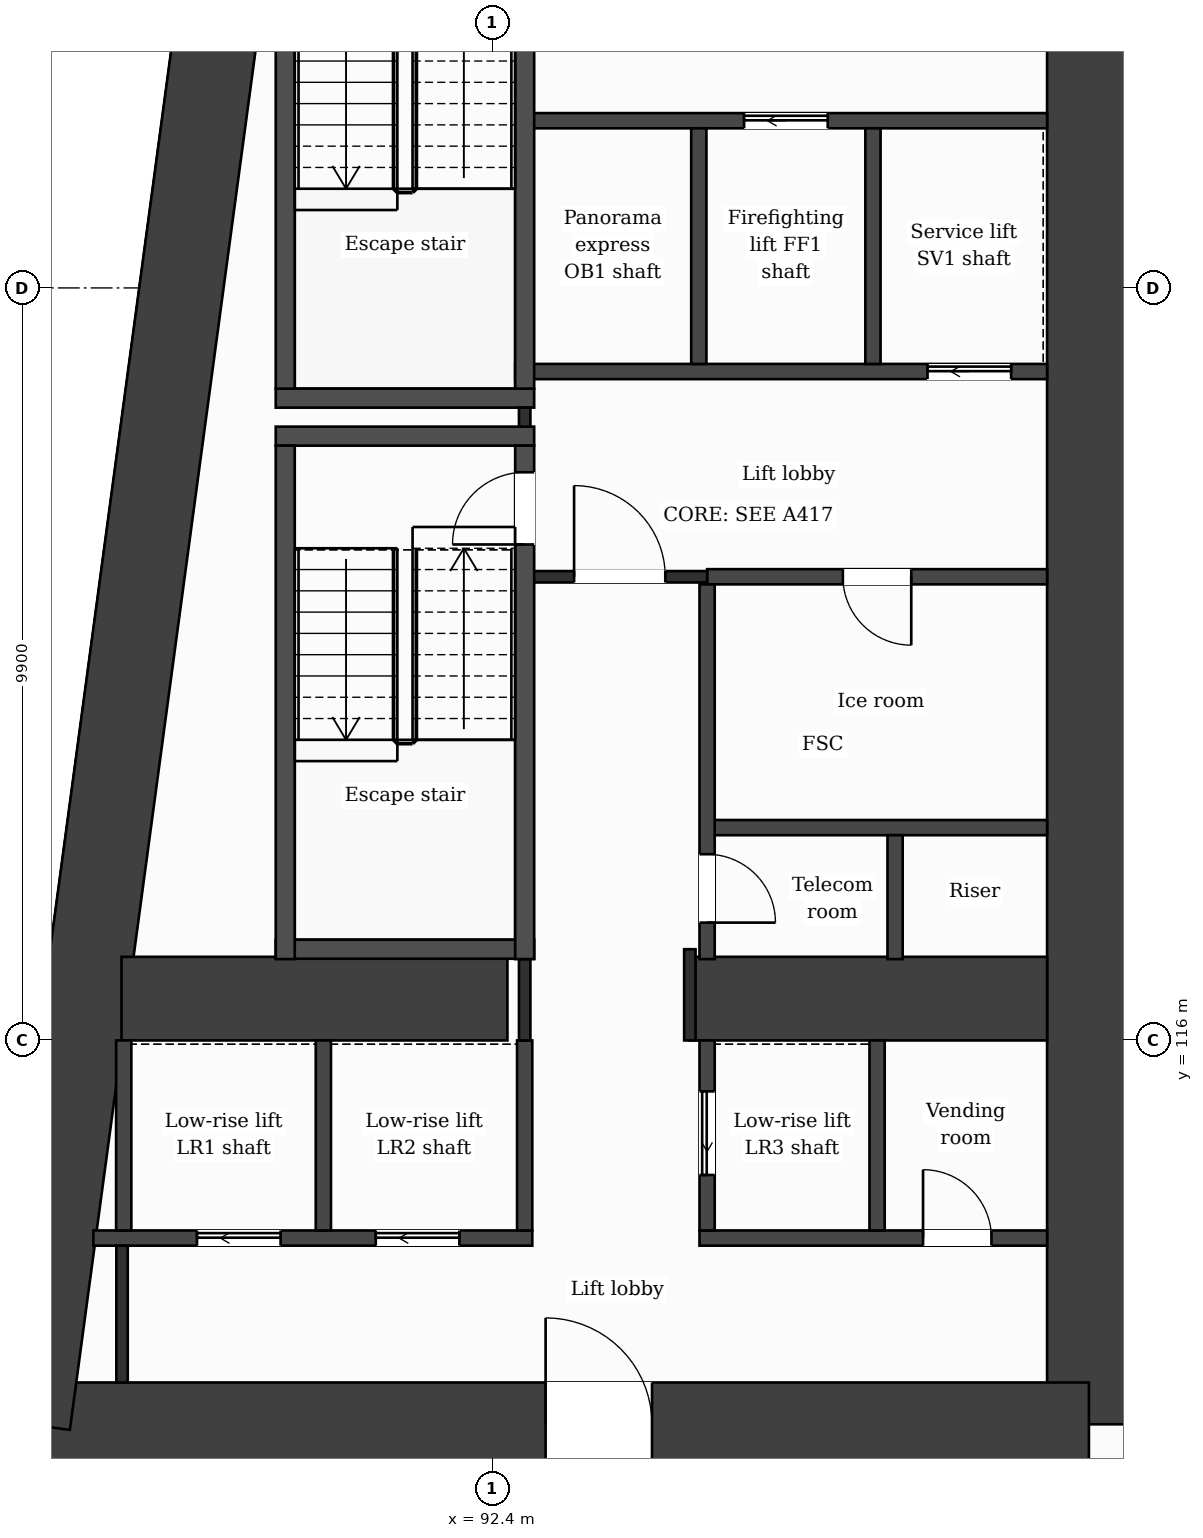
"""IFC4 building model, lengths in metres.
Left out: names, types, materials, properties, quantities, classifications, styles, units other than length and angle.
Written with IfcOpenShell. Run it as: python <this file> out.ifc"""

import sys

from ifc_helpers import new_model, si_unit, direction, frame, frame_2d, origin, place, context, subcontext, project, spatial, rectangle, extrude, element, fill, save


model = new_model("IFC4")
c1 = context("Model", 3, precision=1e-05, world=origin(), true_north=direction((0.0, 1.0)))
c2 = subcontext(c1, "Body", "Model", "MODEL_VIEW")
j1 = project(units=[si_unit("LENGTHUNIT", "METRE"), si_unit("PLANEANGLEUNIT", "RADIAN")], contexts=[c1])
p1 = place(None, origin())
s1 = spatial("IfcSite", under=j1, at=p1, CompositionType="ELEMENT")
p2 = place(p1, origin())
s2 = spatial("IfcBuilding", under=s1, at=p2, CompositionType="ELEMENT")
p3 = place(p2, frame((0.0, 0.0, 74.0)))
s3 = spatial("IfcBuildingStorey", under=s2, at=p3, CompositionType="ELEMENT", Elevation=74.0)
p4 = place(p3, frame((100.25, 131.85, 0.0), z_axis=(0.0, 0.0, 1.0), x_axis=(0.0, -1.0, 0.0)))
e1 = element("IfcWall", 1, at=p4, inside=s3, PredefinedType="SHEAR", context=c2, shape_type="SweptSolid", body=[
    extrude(rectangle(XDim=20.9, YDim=1.1, at=frame_2d((10.45, 0.0))), origin(), (0.0, 0.0, 1.0), 3.5),
])
p5 = place(p3, frame((100.25, 110.95, 0.0), z_axis=(0.0, 0.0, 1.0), x_axis=(-1.0, 0.0, 0.0)))
e2 = element("IfcWall", 2, at=p5, inside=s3, PredefinedType="SHEAR", context=c2, shape_type="SweptSolid", body=[
    extrude(rectangle(XDim=13.952, YDim=1.1, at=frame_2d((6.976, 0.0))), origin(), (0.0, 0.0, 1.0), 3.5),
])
p6 = place(p5, frame((5.748, 0.0, 0.0)))
e3 = element("IfcOpeningElement", 3, at=p6, cuts=e2, PredefinedType="OPENING", context=c2, shape_type="SweptSolid", body=[
    extrude(rectangle(XDim=1.4, YDim=2.1, at=frame_2d((0.7, 1.05))), frame((0.0, 0.56, 0.0), z_axis=(0.0, -1.0, 0.0), x_axis=(1.0, 0.0, 0.0)), (0.0, 0.0, 1.0), 1.12),
])
p7 = place(p3, frame((86.298, 110.95, 0.0), z_axis=(0.0, 0.0, 1.0), x_axis=(0.133400422634, 0.99106222168, 0.0)))
e4 = element("IfcWall", 4, at=p7, inside=s3, PredefinedType="SHEAR", context=c2, shape_type="SweptSolid", body=[
    extrude(rectangle(XDim=21.089, YDim=1.1, at=frame_2d((10.544, 0.0))), origin(), (0.0, 0.0, 1.0), 3.5),
])
p8 = place(p3, frame((87.523, 116.55, 0.0), z_axis=(0.0, 0.0, 1.0), x_axis=(1.0, 0.0, 0.0)))
e5 = element("IfcWall", 5, at=p8, inside=s3, PredefinedType="SHEAR", context=c2, shape_type="SweptSolid", body=[
    extrude(rectangle(XDim=5.077, YDim=1.1, at=frame_2d((2.539, 0.0))), origin(), (0.0, 0.0, 1.0), 3.5),
])
p9 = place(p3, frame((95.0, 116.55, 0.0), z_axis=(0.0, 0.0, 1.0), x_axis=(1.0, 0.0, 0.0)))
e6 = element("IfcWall", 6, at=p9, inside=s3, PredefinedType="SHEAR", context=c2, shape_type="SweptSolid", body=[
    extrude(rectangle(XDim=4.7, YDim=1.1, at=frame_2d((2.35, 0.0))), origin(), (0.0, 0.0, 1.0), 3.5),
])
p10 = place(p3, frame((87.153, 113.4, 0.0), z_axis=(0.0, 0.0, 1.0), x_axis=(1.0, 0.0, 0.0)))
e7 = element("IfcWall", 7, at=p10, inside=s3, PredefinedType="PARTITIONING", context=c2, shape_type="SweptSolid", body=[
    extrude(rectangle(XDim=5.774, YDim=0.2, at=frame_2d((2.887, 0.0))), origin(), (0.0, 0.0, 1.0), 3.18),
])
p11 = place(p10, frame((1.363, 0.0, 0.0)))
e8 = element("IfcOpeningElement", 8, at=p11, cuts=e7, PredefinedType="OPENING", context=c2, shape_type="SweptSolid", body=[
    extrude(rectangle(XDim=1.1, YDim=2.1, at=frame_2d((0.55, 1.05))), frame((0.0, 0.11, 0.0), z_axis=(0.0, -1.0, 0.0), x_axis=(1.0, 0.0, 0.0)), (0.0, 0.0, 1.0), 0.22),
])
p12 = place(p10, frame((3.715, 0.0, 0.0)))
e9 = element("IfcOpeningElement", 9, at=p12, cuts=e7, PredefinedType="OPENING", context=c2, shape_type="SweptSolid", body=[
    extrude(rectangle(XDim=1.1, YDim=2.1, at=frame_2d((0.55, 1.05))), frame((0.0, 0.11, 0.0), z_axis=(0.0, -1.0, 0.0), x_axis=(1.0, 0.0, 0.0)), (0.0, 0.0, 1.0), 0.22),
])
p13 = place(p3, frame((95.127, 113.4, 0.0), z_axis=(0.0, 0.0, 1.0), x_axis=(1.0, 0.0, 0.0)))
e10 = element("IfcWall", 10, at=p13, inside=s3, PredefinedType="PARTITIONING", context=c2, shape_type="SweptSolid", body=[
    extrude(rectangle(XDim=4.573, YDim=0.2, at=frame_2d((2.287, 0.0))), origin(), (0.0, 0.0, 1.0), 3.18),
])
p14 = place(p13, frame((2.941, 0.0, 0.0)))
e11 = element("IfcOpeningElement", 11, at=p14, cuts=e10, PredefinedType="OPENING", context=c2, shape_type="SweptSolid", body=[
    extrude(rectangle(XDim=0.9, YDim=2.1, at=frame_2d((0.45, 1.05))), frame((0.0, 0.11, 0.0), z_axis=(0.0, -1.0, 0.0), x_axis=(1.0, 0.0, 0.0)), (0.0, 0.0, 1.0), 0.22),
])
p15 = place(p3, frame((89.552, 117.2, 0.0), z_axis=(0.0, 0.0, 1.0), x_axis=(1.0, 0.0, 0.0)))
e12 = element("IfcWall", 12, at=p15, inside=s3, PredefinedType="PARTITIONING", context=c2, shape_type="SweptSolid", body=[
    extrude(rectangle(XDim=3.4, YDim=0.25, at=frame_2d((1.7, 0.0))), origin(), (0.0, 0.0, 1.0), 3.18),
])
p16 = place(p3, frame((95.227, 118.8, 0.0), z_axis=(0.0, 0.0, 1.0), x_axis=(1.0, 0.0, 0.0)))
e13 = element("IfcWall", 13, at=p16, inside=s3, PredefinedType="PARTITIONING", context=c2, shape_type="SweptSolid", body=[
    extrude(rectangle(XDim=4.473, YDim=0.2, at=frame_2d((2.236, 0.0))), origin(), (0.0, 0.0, 1.0), 3.18),
])
p17 = place(p3, frame((95.227, 122.1, 0.0), z_axis=(0.0, 0.0, 1.0), x_axis=(1.0, 0.0, 0.0)))
e14 = element("IfcWall", 14, at=p17, inside=s3, PredefinedType="PARTITIONING", context=c2, shape_type="SweptSolid", body=[
    extrude(rectangle(XDim=4.473, YDim=0.2, at=frame_2d((2.236, 0.0))), origin(), (0.0, 0.0, 1.0), 3.18),
])
p18 = place(p17, frame((1.786, 0.0, 0.0)))
e15 = element("IfcOpeningElement", 15, at=p18, cuts=e14, PredefinedType="OPENING", context=c2, shape_type="SweptSolid", body=[
    extrude(rectangle(XDim=0.9, YDim=2.1, at=frame_2d((0.45, 1.05))), frame((0.0, 0.11, 0.0), z_axis=(0.0, -1.0, 0.0), x_axis=(1.0, 0.0, 0.0)), (0.0, 0.0, 1.0), 0.22),
])
p19 = place(p3, frame((92.827, 122.1, 0.0), z_axis=(0.0, 0.0, 1.0), x_axis=(1.0, 0.0, 0.0)))
e16 = element("IfcWall", 16, at=p19, inside=s3, PredefinedType="PARTITIONING", context=c2, shape_type="SweptSolid", body=[
    extrude(rectangle(XDim=2.4, YDim=0.15, at=frame_2d((1.2, 0.0))), origin(), (0.0, 0.0, 1.0), 3.18),
])
p20 = place(p19, frame((0.65, 0.0, 0.0)))
e17 = element("IfcOpeningElement", 17, at=p20, cuts=e16, PredefinedType="OPENING", context=c2, shape_type="SweptSolid", body=[
    extrude(rectangle(XDim=1.2, YDim=2.1, at=frame_2d((0.6, 1.05))), frame((0.0, 0.085, 0.0), z_axis=(0.0, -1.0, 0.0), x_axis=(1.0, 0.0, 0.0)), (0.0, 0.0, 1.0), 0.17),
])
for number, where, z_axis, x_axis in (
    (18, (89.552, 123.95, 0.0), (0.0, 0.0, 1.0), (1.0, 0.0, 0.0)),
    (19, (89.552, 124.45, 0.0), (0.0, 0.0, 1.0), (1.0, 0.0, 0.0)),
):
    element("IfcWall", number, at=place(p3, frame(where, z_axis=z_axis, x_axis=x_axis)), inside=s3, PredefinedType="PARTITIONING", context=c2, shape_type="SweptSolid", body=[
        extrude(rectangle(XDim=3.4, YDim=0.25, at=frame_2d((1.7, 0.0))), origin(), (0.0, 0.0, 1.0), 3.18),
    ])
p21 = place(p3, frame((92.702, 124.8, 0.0), z_axis=(0.0, 0.0, 1.0), x_axis=(1.0, 0.0, 0.0)))
e20 = element("IfcWall", 20, at=p21, inside=s3, PredefinedType="PARTITIONING", context=c2, shape_type="SweptSolid", body=[
    extrude(rectangle(XDim=6.998, YDim=0.2, at=frame_2d((3.499, 0.0))), origin(), (0.0, 0.0, 1.0), 3.18),
])
p22 = place(p21, frame((5.425, 0.0, 0.0)))
e21 = element("IfcOpeningElement", 21, at=p22, cuts=e20, PredefinedType="OPENING", context=c2, shape_type="SweptSolid", body=[
    extrude(rectangle(XDim=1.1, YDim=2.1, at=frame_2d((0.55, 1.05))), frame((0.0, 0.11, 0.0), z_axis=(0.0, -1.0, 0.0), x_axis=(1.0, 0.0, 0.0)), (0.0, 0.0, 1.0), 0.22),
])
p23 = place(p3, frame((92.827, 128.1, 0.0), z_axis=(0.0, 0.0, 1.0), x_axis=(1.0, 0.0, 0.0)))
e22 = element("IfcWall", 22, at=p23, inside=s3, PredefinedType="PARTITIONING", context=c2, shape_type="SweptSolid", body=[
    extrude(rectangle(XDim=6.873, YDim=0.2, at=frame_2d((3.437, 0.0))), origin(), (0.0, 0.0, 1.0), 3.18),
])
p24 = place(p23, frame((2.887, 0.0, 0.0)))
e23 = element("IfcOpeningElement", 23, at=p24, cuts=e22, PredefinedType="OPENING", context=c2, shape_type="SweptSolid", body=[
    extrude(rectangle(XDim=1.1, YDim=2.1, at=frame_2d((0.55, 1.05))), frame((0.0, 0.11, 0.0), z_axis=(0.0, -1.0, 0.0), x_axis=(1.0, 0.0, 0.0)), (0.0, 0.0, 1.0), 0.22),
])
p25 = place(p3, frame((87.552, 113.5, 0.0), z_axis=(0.0, 0.0, 1.0), x_axis=(0.0, 1.0, 0.0)))
e24 = element("IfcWall", 24, at=p25, inside=s3, PredefinedType="PARTITIONING", context=c2, shape_type="SweptSolid", body=[
    extrude(rectangle(XDim=2.5, YDim=0.2, at=frame_2d((1.25, 0.0))), origin(), (0.0, 0.0, 1.0), 3.18),
])
p26 = place(p3, frame((87.53, 111.5, 0.0), z_axis=(0.0, 0.0, 1.0), x_axis=(0.0, 1.0, 0.0)))
e25 = element("IfcWall", 25, at=p26, inside=s3, PredefinedType="PARTITIONING", context=c2, shape_type="SweptSolid", body=[
    extrude(rectangle(XDim=1.8, YDim=0.15, at=frame_2d((0.9, 0.0))), origin(), (0.0, 0.0, 1.0), 3.18),
])
p27 = place(p3, frame((89.677, 117.07, 0.0), z_axis=(0.0, 0.0, 1.0), x_axis=(0.0, 1.0, 0.0)))
e26 = element("IfcWall", 26, at=p27, inside=s3, PredefinedType="PARTITIONING", context=c2, shape_type="SweptSolid", body=[
    extrude(rectangle(XDim=6.755, YDim=0.25, at=frame_2d((3.377, 0.0))), origin(), (0.0, 0.0, 1.0), 3.18),
])
p28 = place(p3, frame((89.677, 124.575, 0.0), z_axis=(0.0, 0.0, 1.0), x_axis=(0.0, 1.0, 0.0)))
e27 = element("IfcWall", 27, at=p28, inside=s3, PredefinedType="PARTITIONING", context=c2, shape_type="SweptSolid", body=[
    extrude(rectangle(XDim=6.5, YDim=0.25, at=frame_2d((3.25, 0.0))), origin(), (0.0, 0.0, 1.0), 3.18),
])
for number, where, z_axis, x_axis in (
    (28, (90.178, 113.5, 0.0), (0.0, 0.0, 1.0), (0.0, 1.0, 0.0)),
    (29, (92.827, 113.5, 0.0), (0.0, 0.0, 1.0), (0.0, 1.0, 0.0)),
):
    element("IfcWall", number, at=place(p3, frame(where, z_axis=z_axis, x_axis=x_axis)), inside=s3, PredefinedType="PARTITIONING", context=c2, shape_type="SweptSolid", body=[
        extrude(rectangle(XDim=2.5, YDim=0.2, at=frame_2d((1.25, 0.0))), origin(), (0.0, 0.0, 1.0), 3.18),
    ])
p29 = place(p3, frame((92.827, 116.0, 0.0), z_axis=(0.0, 0.0, 1.0), x_axis=(0.0, 1.0, 0.0)))
e30 = element("IfcWall", 30, at=p29, inside=s3, PredefinedType="PARTITIONING", context=c2, shape_type="SweptSolid", body=[
    extrude(rectangle(XDim=1.07, YDim=0.15, at=frame_2d((0.535, 0.0))), origin(), (0.0, 0.0, 1.0), 3.18),
])
p30 = place(p3, frame((92.827, 124.075, 0.0), z_axis=(0.0, 0.0, 1.0), x_axis=(0.0, 1.0, 0.0)))
e31 = element("IfcWall", 31, at=p30, inside=s3, PredefinedType="PARTITIONING", context=c2, shape_type="SweptSolid", body=[
    extrude(rectangle(XDim=0.25, YDim=0.15, at=frame_2d((0.125, 0.0))), origin(), (0.0, 0.0, 1.0), 3.18),
])
p31 = place(p3, frame((92.827, 117.07, 0.0), z_axis=(0.0, 0.0, 1.0), x_axis=(0.0, 1.0, 0.0)))
e32 = element("IfcWall", 32, at=p31, inside=s3, PredefinedType="PARTITIONING", context=c2, shape_type="SweptSolid", body=[
    extrude(rectangle(XDim=6.755, YDim=0.25, at=frame_2d((3.377, 0.0))), origin(), (0.0, 0.0, 1.0), 3.18),
])
p32 = place(p31, frame((5.455, 0.0, 0.0)))
e33 = element("IfcOpeningElement", 33, at=p32, cuts=e32, PredefinedType="OPENING", context=c2, shape_type="SweptSolid", body=[
    extrude(rectangle(XDim=0.95, YDim=2.1, at=frame_2d((0.475, 1.05))), frame((0.0, 0.135, 0.0), z_axis=(0.0, -1.0, 0.0), x_axis=(1.0, 0.0, 0.0)), (0.0, 0.0, 1.0), 0.27),
])
p33 = place(p3, frame((92.827, 124.575, 0.0), z_axis=(0.0, 0.0, 1.0), x_axis=(0.0, 1.0, 0.0)))
e34 = element("IfcWall", 34, at=p33, inside=s3, PredefinedType="PARTITIONING", context=c2, shape_type="SweptSolid", body=[
    extrude(rectangle(XDim=6.755, YDim=0.25, at=frame_2d((3.377, 0.0))), origin(), (0.0, 0.0, 1.0), 3.18),
])
p34 = place(p33, frame((5.325, 0.0, 0.0)))
e35 = element("IfcOpeningElement", 35, at=p34, cuts=e34, PredefinedType="OPENING", context=c2, shape_type="SweptSolid", body=[
    extrude(rectangle(XDim=1.0, YDim=2.1, at=frame_2d((0.5, 1.05))), frame((0.0, 0.135, 0.0), z_axis=(0.0, -1.0, 0.0), x_axis=(1.0, 0.0, 0.0)), (0.0, 0.0, 1.0), 0.27),
])
p35 = place(p3, frame((95.0, 116.0, 0.0), z_axis=(0.0, 0.0, 1.0), x_axis=(0.0, 1.0, 0.0)))
e36 = element("IfcWall", 36, at=p35, inside=s3, PredefinedType="PARTITIONING", context=c2, shape_type="SweptSolid", body=[
    extrude(rectangle(XDim=1.2, YDim=0.15, at=frame_2d((0.6, 0.0))), origin(), (0.0, 0.0, 1.0), 3.18),
])
p36 = place(p3, frame((95.118, 124.9, 0.0), z_axis=(0.0, 0.0, 1.0), x_axis=(0.0, 1.0, 0.0)))
e37 = element("IfcWall", 37, at=p36, inside=s3, PredefinedType="PARTITIONING", context=c2, shape_type="SweptSolid", body=[
    extrude(rectangle(XDim=3.1, YDim=0.2, at=frame_2d((1.55, 0.0))), origin(), (0.0, 0.0, 1.0), 3.18),
])
p37 = place(p3, frame((95.227, 113.5, 0.0), z_axis=(0.0, 0.0, 1.0), x_axis=(0.0, 1.0, 0.0)))
e38 = element("IfcWall", 38, at=p37, inside=s3, PredefinedType="PARTITIONING", context=c2, shape_type="SweptSolid", body=[
    extrude(rectangle(XDim=2.5, YDim=0.2, at=frame_2d((1.25, 0.0))), origin(), (0.0, 0.0, 1.0), 3.18),
])
p38 = place(p37, frame((0.73, 0.0, 0.0)))
e39 = element("IfcOpeningElement", 39, at=p38, cuts=e38, PredefinedType="OPENING", context=c2, shape_type="SweptSolid", body=[
    extrude(rectangle(XDim=1.1, YDim=2.1, at=frame_2d((0.55, 1.05))), frame((0.0, 0.11, 0.0), z_axis=(0.0, -1.0, 0.0), x_axis=(1.0, 0.0, 0.0)), (0.0, 0.0, 1.0), 0.22),
])
p39 = place(p3, frame((95.227, 117.07, 0.0), z_axis=(0.0, 0.0, 1.0), x_axis=(0.0, 1.0, 0.0)))
e40 = element("IfcWall", 40, at=p39, inside=s3, PredefinedType="PARTITIONING", context=c2, shape_type="SweptSolid", body=[
    extrude(rectangle(XDim=4.93, YDim=0.2, at=frame_2d((2.465, 0.0))), origin(), (0.0, 0.0, 1.0), 3.18),
])
p40 = place(p39, frame((0.48, 0.0, 0.0)))
e41 = element("IfcOpeningElement", 41, at=p40, cuts=e40, PredefinedType="OPENING", context=c2, shape_type="SweptSolid", body=[
    extrude(rectangle(XDim=0.9, YDim=2.1, at=frame_2d((0.45, 1.05))), frame((0.0, 0.11, 0.0), z_axis=(0.0, -1.0, 0.0), x_axis=(1.0, 0.0, 0.0)), (0.0, 0.0, 1.0), 0.22),
])
p41 = place(p3, frame((97.409, 124.9, 0.0), z_axis=(0.0, 0.0, 1.0), x_axis=(0.0, 1.0, 0.0)))
e42 = element("IfcWall", 42, at=p41, inside=s3, PredefinedType="PARTITIONING", context=c2, shape_type="SweptSolid", body=[
    extrude(rectangle(XDim=3.1, YDim=0.2, at=frame_2d((1.55, 0.0))), origin(), (0.0, 0.0, 1.0), 3.18),
])
p42 = place(p3, frame((97.463, 113.5, 0.0), z_axis=(0.0, 0.0, 1.0), x_axis=(0.0, 1.0, 0.0)))
e43 = element("IfcWall", 43, at=p42, inside=s3, PredefinedType="PARTITIONING", context=c2, shape_type="SweptSolid", body=[
    extrude(rectangle(XDim=2.5, YDim=0.2, at=frame_2d((1.25, 0.0))), origin(), (0.0, 0.0, 1.0), 3.18),
])
p43 = place(p3, frame((97.7, 117.07, 0.0), z_axis=(0.0, 0.0, 1.0), x_axis=(0.0, 1.0, 0.0)))
e44 = element("IfcWall", 44, at=p43, inside=s3, PredefinedType="PARTITIONING", context=c2, shape_type="SweptSolid", body=[
    extrude(rectangle(XDim=1.63, YDim=0.2, at=frame_2d((0.815, 0.0))), origin(), (0.0, 0.0, 1.0), 3.18),
])
p44 = place(p20, origin())
e45 = element("IfcDoor", 45, at=p44, inside=s3, OperationType="SINGLE_SWING_LEFT", PredefinedType="DOOR", context=c2, shape_type="SweptSolid", body=[
    extrude(rectangle(XDim=1.2, YDim=2.1, at=frame_2d((0.6, 1.05))), frame((0.0, 0.025, 0.0), z_axis=(0.0, -1.0, 0.0), x_axis=(1.0, 0.0, 0.0)), (0.0, 0.0, 1.0), 0.05),
])
fill(e17, e45)
p45 = place(p24, origin())
e46 = element("IfcDoor", 46, at=p45, inside=s3, OperationType="SLIDING_TO_LEFT", PredefinedType="DOOR", context=c2, shape_type="SweptSolid", body=[
    extrude(rectangle(XDim=1.1, YDim=2.1, at=frame_2d((0.55, 1.05))), frame((0.0, 0.025, 0.0), z_axis=(0.0, -1.0, 0.0), x_axis=(1.0, 0.0, 0.0)), (0.0, 0.0, 1.0), 0.05),
])
fill(e23, e46)
p46 = place(p22, origin())
e47 = element("IfcDoor", 47, at=p46, inside=s3, OperationType="SLIDING_TO_LEFT", PredefinedType="DOOR", context=c2, shape_type="SweptSolid", body=[
    extrude(rectangle(XDim=1.1, YDim=2.1, at=frame_2d((0.55, 1.05))), frame((0.0, 0.025, 0.0), z_axis=(0.0, -1.0, 0.0), x_axis=(1.0, 0.0, 0.0)), (0.0, 0.0, 1.0), 0.05),
])
fill(e21, e47)
p47 = place(p18, origin())
e48 = element("IfcDoor", 48, at=p47, inside=s3, OperationType="SINGLE_SWING_RIGHT", PredefinedType="DOOR", context=c2, shape_type="SweptSolid", body=[
    extrude(rectangle(XDim=0.9, YDim=2.1, at=frame_2d((0.45, 1.05))), frame((0.0, 0.025, 0.0), z_axis=(0.0, -1.0, 0.0), x_axis=(1.0, 0.0, 0.0)), (0.0, 0.0, 1.0), 0.05),
])
fill(e15, e48)
p48 = place(p32, origin())
e49 = element("IfcDoor", 49, at=p48, inside=s3, OperationType="SINGLE_SWING_LEFT", PredefinedType="DOOR", context=c2, shape_type="SweptSolid", body=[
    extrude(rectangle(XDim=0.95, YDim=2.1, at=frame_2d((0.475, 1.05))), frame((0.0, 0.025, 0.0), z_axis=(0.0, -1.0, 0.0), x_axis=(1.0, 0.0, 0.0)), (0.0, 0.0, 1.0), 0.05),
])
fill(e33, e49)
p49 = place(p40, origin())
e50 = element("IfcDoor", 50, at=p49, inside=s3, OperationType="SINGLE_SWING_LEFT", PredefinedType="DOOR", context=c2, shape_type="SweptSolid", body=[
    extrude(rectangle(XDim=0.9, YDim=2.1, at=frame_2d((0.45, 1.05))), frame((0.0, 0.025, 0.0), z_axis=(0.0, -1.0, 0.0), x_axis=(1.0, 0.0, 0.0)), (0.0, 0.0, 1.0), 0.05),
])
fill(e41, e50)
p50 = place(p11, origin())
e51 = element("IfcDoor", 51, at=p50, inside=s3, OperationType="SLIDING_TO_LEFT", PredefinedType="DOOR", context=c2, shape_type="SweptSolid", body=[
    extrude(rectangle(XDim=1.1, YDim=2.1, at=frame_2d((0.55, 1.05))), frame((0.0, 0.025, 0.0), z_axis=(0.0, -1.0, 0.0), x_axis=(1.0, 0.0, 0.0)), (0.0, 0.0, 1.0), 0.05),
])
fill(e8, e51)
p51 = place(p12, origin())
e52 = element("IfcDoor", 52, at=p51, inside=s3, OperationType="SLIDING_TO_LEFT", PredefinedType="DOOR", context=c2, shape_type="SweptSolid", body=[
    extrude(rectangle(XDim=1.1, YDim=2.1, at=frame_2d((0.55, 1.05))), frame((0.0, 0.025, 0.0), z_axis=(0.0, -1.0, 0.0), x_axis=(1.0, 0.0, 0.0)), (0.0, 0.0, 1.0), 0.05),
])
fill(e9, e52)
p52 = place(p38, origin())
e53 = element("IfcDoor", 53, at=p52, inside=s3, OperationType="SLIDING_TO_LEFT", PredefinedType="DOOR", context=c2, shape_type="SweptSolid", body=[
    extrude(rectangle(XDim=1.1, YDim=2.1, at=frame_2d((0.55, 1.05))), frame((0.0, 0.025, 0.0), z_axis=(0.0, -1.0, 0.0), x_axis=(1.0, 0.0, 0.0)), (0.0, 0.0, 1.0), 0.05),
])
fill(e39, e53)
p53 = place(p14, origin())
e54 = element("IfcDoor", 54, at=p53, inside=s3, OperationType="SINGLE_SWING_LEFT", PredefinedType="DOOR", context=c2, shape_type="SweptSolid", body=[
    extrude(rectangle(XDim=0.9, YDim=2.1, at=frame_2d((0.45, 1.05))), frame((0.0, 0.025, 0.0), z_axis=(0.0, -1.0, 0.0), x_axis=(1.0, 0.0, 0.0)), (0.0, 0.0, 1.0), 0.05),
])
fill(e11, e54)
p54 = place(p6, origin())
e55 = element("IfcDoor", 55, at=p54, inside=s3, OperationType="SINGLE_SWING_RIGHT", PredefinedType="DOOR", context=c2, shape_type="SweptSolid", body=[
    extrude(rectangle(XDim=1.4, YDim=2.1, at=frame_2d((0.7, 1.05))), frame((0.0, 0.025, 0.0), z_axis=(0.0, -1.0, 0.0), x_axis=(1.0, 0.0, 0.0)), (0.0, 0.0, 1.0), 0.05),
])
fill(e3, e55)
save(model, sys.argv[1])
